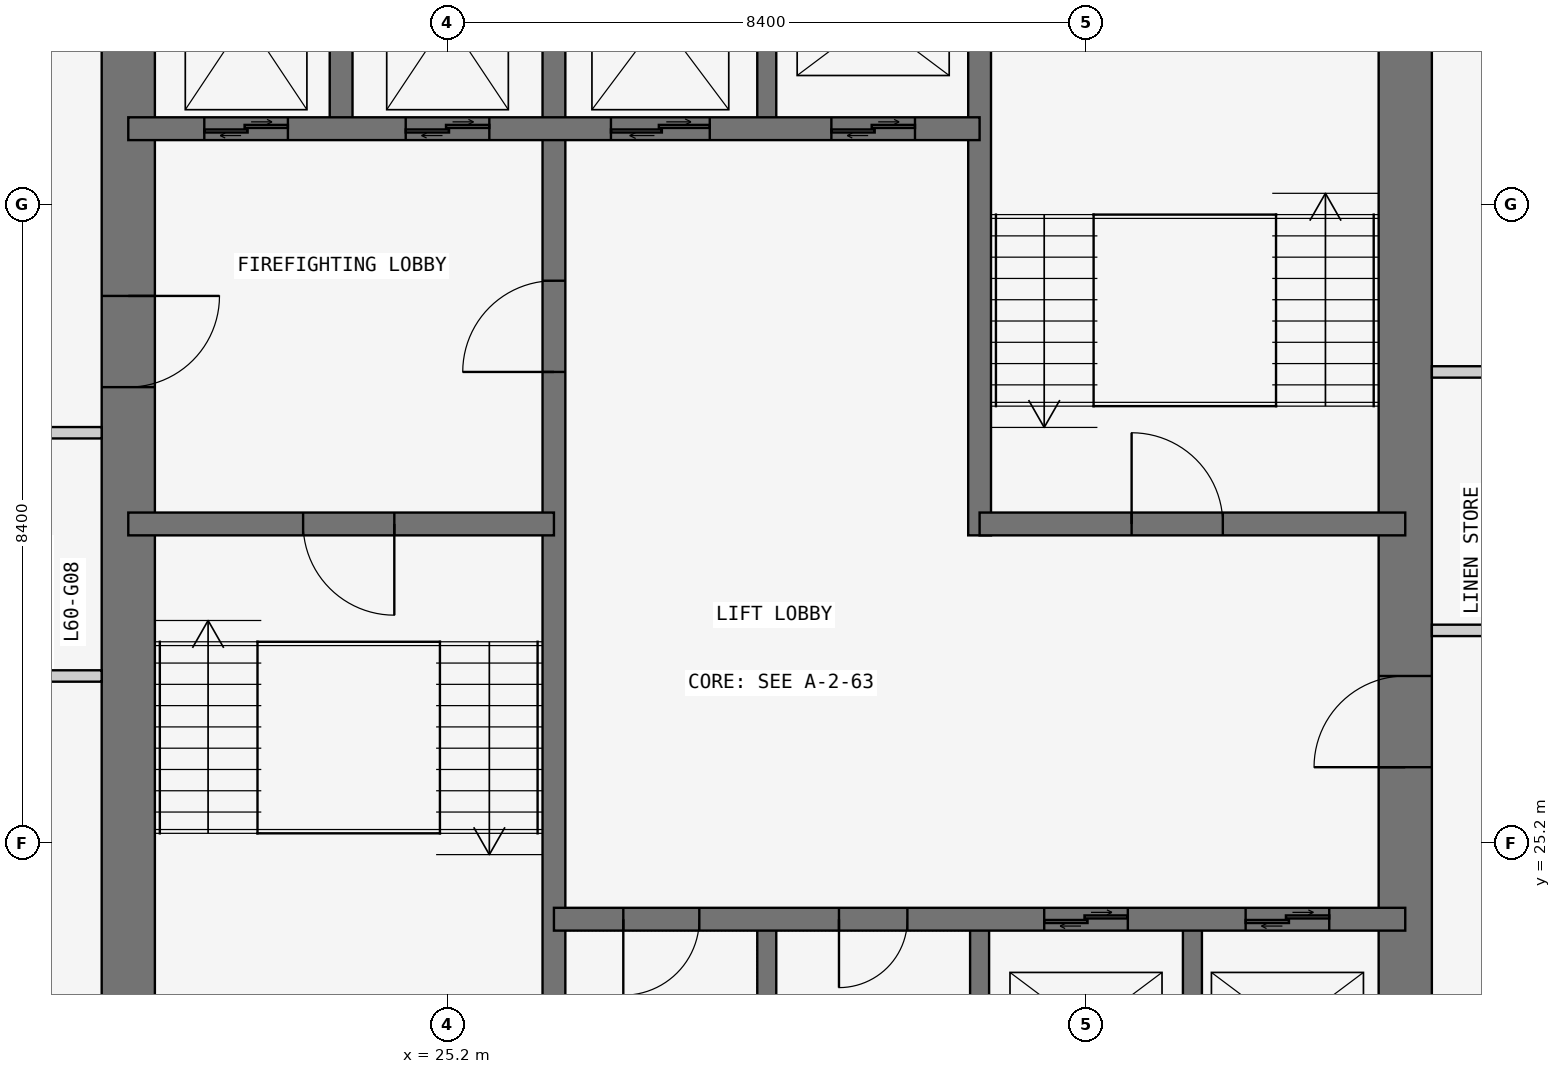
"""IFC4 building model, lengths in metres.
Left out: names, types, materials, properties, quantities, classifications, styles, units other than length and angle.
Written with IfcOpenShell. Run it as: python <this file> out.ifc"""

import sys

from ifc_helpers import new_model, si_unit, direction, frame, frame_2d, origin, place, context, subcontext, project, spatial, rectangle, extrude, element, fill, save


model = new_model("IFC4")
c1 = context("Model", 3, precision=1e-05, world=origin(), true_north=direction((0.0, 1.0)))
c2 = subcontext(c1, "Body", "Model", "MODEL_VIEW")
j1 = project(units=[si_unit("LENGTHUNIT", "METRE"), si_unit("PLANEANGLEUNIT", "RADIAN")], contexts=[c1])
p1 = place(None, origin())
s1 = spatial("IfcSite", under=j1, at=p1, CompositionType="ELEMENT")
p2 = place(p1, origin())
s2 = spatial("IfcBuilding", under=s1, at=p2, CompositionType="ELEMENT")
p3 = place(p2, frame((0.0, 0.0, 230.1)))
s3 = spatial("IfcBuildingStorey", under=s2, at=p3, CompositionType="ELEMENT", Elevation=230.1)
p4 = place(p3, frame((37.8, 21.0, 0.0), z_axis=(0.0, 0.0, 1.0), x_axis=(0.0, 1.0, 0.0)))
e1 = element("IfcWall", 1, at=p4, inside=s3, PredefinedType="SHEAR", context=c2, shape_type="SweptSolid", body=[
    extrude(rectangle(XDim=17.15, YDim=0.7, at=frame_2d((8.575, 0.0))), origin(), (0.0, 0.0, 1.0), 3.6),
])
p5 = place(p4, frame((5.2, 0.0, 0.0)))
e2 = element("IfcOpeningElement", 2, at=p5, cuts=e1, PredefinedType="OPENING", context=c2, shape_type="SweptSolid", body=[
    extrude(rectangle(XDim=1.2, YDim=2.1, at=frame_2d((0.6, 1.05))), frame((0.0, 0.36, 0.0), z_axis=(0.0, -1.0, 0.0), x_axis=(1.0, 0.0, 0.0)), (0.0, 0.0, 1.0), 0.72),
])
p6 = place(p3, frame((21.0, 37.8, 0.0), z_axis=(0.0, 0.0, 1.0), x_axis=(0.0, -1.0, 0.0)))
e3 = element("IfcWall", 3, at=p6, inside=s3, PredefinedType="SHEAR", context=c2, shape_type="SweptSolid", body=[
    extrude(rectangle(XDim=17.15, YDim=0.7, at=frame_2d((8.575, 0.0))), origin(), (0.0, 0.0, 1.0), 3.6),
])
p7 = place(p6, frame((5.4, 0.0, 0.0)))
e4 = element("IfcOpeningElement", 4, at=p7, cuts=e3, PredefinedType="OPENING", context=c2, shape_type="SweptSolid", body=[
    extrude(rectangle(XDim=1.2, YDim=2.1, at=frame_2d((0.6, 1.05))), frame((0.0, 0.36, 0.0), z_axis=(0.0, -1.0, 0.0), x_axis=(1.0, 0.0, 0.0)), (0.0, 0.0, 1.0), 0.72),
])
p8 = place(p3, frame((26.6, 21.0, 0.0), z_axis=(0.0, 0.0, 1.0), x_axis=(0.0, 1.0, 0.0)))
e5 = element("IfcWall", 5, at=p8, inside=s3, PredefinedType="SHEAR", context=c2, shape_type="SweptSolid", body=[
    extrude(rectangle(XDim=16.8, YDim=0.3, at=frame_2d((8.4, 0.0))), origin(), (0.0, 0.0, 1.0), 3.6),
])
p9 = place(p8, frame((10.4, 0.0, 0.0)))
e6 = element("IfcOpeningElement", 6, at=p9, cuts=e5, PredefinedType="OPENING", context=c2, shape_type="SweptSolid", body=[
    extrude(rectangle(XDim=1.2, YDim=2.1, at=frame_2d((0.6, 1.05))), frame((0.0, 0.16, 0.0), z_axis=(0.0, -1.0, 0.0), x_axis=(1.0, 0.0, 0.0)), (0.0, 0.0, 1.0), 0.32),
])
p10 = place(p3, frame((21.0, 29.4, 0.0), z_axis=(0.0, 0.0, 1.0), x_axis=(1.0, 0.0, 0.0)))
e7 = element("IfcWall", 7, at=p10, inside=s3, PredefinedType="SHEAR", context=c2, shape_type="SweptSolid", body=[
    extrude(rectangle(XDim=5.6, YDim=0.3, at=frame_2d((2.8, 0.0))), origin(), (0.0, 0.0, 1.0), 3.6),
])
p11 = place(p10, frame((2.3, 0.0, 0.0)))
e8 = element("IfcOpeningElement", 8, at=p11, cuts=e7, PredefinedType="OPENING", context=c2, shape_type="SweptSolid", body=[
    extrude(rectangle(XDim=1.2, YDim=2.1, at=frame_2d((0.6, 1.05))), frame((0.0, 0.16, 0.0), z_axis=(0.0, -1.0, 0.0), x_axis=(1.0, 0.0, 0.0)), (0.0, 0.0, 1.0), 0.32),
])
p12 = place(p3, frame((21.0, 34.6, 0.0), z_axis=(0.0, 0.0, 1.0), x_axis=(1.0, 0.0, 0.0)))
e9 = element("IfcWall", 9, at=p12, inside=s3, PredefinedType="SHEAR", context=c2, shape_type="SweptSolid", body=[
    extrude(rectangle(XDim=11.2, YDim=0.3, at=frame_2d((5.6, 0.0))), origin(), (0.0, 0.0, 1.0), 3.6),
])
p13 = place(p12, frame((9.25, 0.0, 0.0)))
e10 = element("IfcOpeningElement", 10, at=p13, cuts=e9, PredefinedType="OPENING", context=c2, shape_type="SweptSolid", body=[
    extrude(rectangle(XDim=1.1, YDim=2.1, at=frame_2d((0.55, 1.05))), frame((0.0, 0.16, 0.0), z_axis=(0.0, -1.0, 0.0), x_axis=(1.0, 0.0, 0.0)), (0.0, 0.0, 1.0), 0.32),
])
p14 = place(p12, frame((1.0, 0.0, 0.0)))
e11 = element("IfcOpeningElement", 11, at=p14, cuts=e9, PredefinedType="OPENING", context=c2, shape_type="SweptSolid", body=[
    extrude(rectangle(XDim=1.1, YDim=2.1, at=frame_2d((0.55, 1.05))), frame((0.0, 0.16, 0.0), z_axis=(0.0, -1.0, 0.0), x_axis=(1.0, 0.0, 0.0)), (0.0, 0.0, 1.0), 0.32),
])
p15 = place(p12, frame((3.65, 0.0, 0.0)))
e12 = element("IfcOpeningElement", 12, at=p15, cuts=e9, PredefinedType="OPENING", context=c2, shape_type="SweptSolid", body=[
    extrude(rectangle(XDim=1.1, YDim=2.1, at=frame_2d((0.55, 1.05))), frame((0.0, 0.16, 0.0), z_axis=(0.0, -1.0, 0.0), x_axis=(1.0, 0.0, 0.0)), (0.0, 0.0, 1.0), 0.32),
])
p16 = place(p12, frame((6.35, 0.0, 0.0)))
e13 = element("IfcOpeningElement", 13, at=p16, cuts=e9, PredefinedType="OPENING", context=c2, shape_type="SweptSolid", body=[
    extrude(rectangle(XDim=1.3, YDim=2.1, at=frame_2d((0.65, 1.05))), frame((0.0, 0.16, 0.0), z_axis=(0.0, -1.0, 0.0), x_axis=(1.0, 0.0, 0.0)), (0.0, 0.0, 1.0), 0.32),
])
p17 = place(p3, frame((23.8, 34.6, 0.0), z_axis=(0.0, 0.0, 1.0), x_axis=(0.0, 1.0, 0.0)))
e14 = element("IfcWall", 14, at=p17, inside=s3, PredefinedType="SHEAR", context=c2, shape_type="SweptSolid", body=[
    extrude(rectangle(XDim=3.2, YDim=0.3, at=frame_2d((1.6, 0.0))), origin(), (0.0, 0.0, 1.0), 3.6),
])
p18 = place(p3, frame((26.6, 24.2, 0.0), z_axis=(0.0, 0.0, 1.0), x_axis=(1.0, 0.0, 0.0)))
e15 = element("IfcWall", 15, at=p18, inside=s3, PredefinedType="SHEAR", context=c2, shape_type="SweptSolid", body=[
    extrude(rectangle(XDim=11.2, YDim=0.3, at=frame_2d((5.6, 0.0))), origin(), (0.0, 0.0, 1.0), 3.6),
])
p19 = place(p18, frame((0.913, 0.0, 0.0)))
e16 = element("IfcOpeningElement", 16, at=p19, cuts=e15, PredefinedType="OPENING", context=c2, shape_type="SweptSolid", body=[
    extrude(rectangle(XDim=1.0, YDim=2.1, at=frame_2d((0.5, 1.05))), frame((0.0, 0.16, 0.0), z_axis=(0.0, -1.0, 0.0), x_axis=(1.0, 0.0, 0.0)), (0.0, 0.0, 1.0), 0.32),
])
p20 = place(p18, frame((3.75, 0.0, 0.0)))
e17 = element("IfcOpeningElement", 17, at=p20, cuts=e15, PredefinedType="OPENING", context=c2, shape_type="SweptSolid", body=[
    extrude(rectangle(XDim=0.9, YDim=2.1, at=frame_2d((0.45, 1.05))), frame((0.0, 0.16, 0.0), z_axis=(0.0, -1.0, 0.0), x_axis=(1.0, 0.0, 0.0)), (0.0, 0.0, 1.0), 0.32),
])
p21 = place(p18, frame((6.45, 0.0, 0.0)))
e18 = element("IfcOpeningElement", 18, at=p21, cuts=e15, PredefinedType="OPENING", context=c2, shape_type="SweptSolid", body=[
    extrude(rectangle(XDim=1.1, YDim=2.1, at=frame_2d((0.55, 1.05))), frame((0.0, 0.16, 0.0), z_axis=(0.0, -1.0, 0.0), x_axis=(1.0, 0.0, 0.0)), (0.0, 0.0, 1.0), 0.32),
])
p22 = place(p18, frame((9.1, 0.0, 0.0)))
e19 = element("IfcOpeningElement", 19, at=p22, cuts=e15, PredefinedType="OPENING", context=c2, shape_type="SweptSolid", body=[
    extrude(rectangle(XDim=1.1, YDim=2.1, at=frame_2d((0.55, 1.05))), frame((0.0, 0.16, 0.0), z_axis=(0.0, -1.0, 0.0), x_axis=(1.0, 0.0, 0.0)), (0.0, 0.0, 1.0), 0.32),
])
p23 = place(p3, frame((32.2, 29.25, 0.0), z_axis=(0.0, 0.0, 1.0), x_axis=(0.0, 1.0, 0.0)))
e20 = element("IfcWall", 20, at=p23, inside=s3, PredefinedType="SHEAR", context=c2, shape_type="SweptSolid", body=[
    extrude(rectangle(XDim=8.55, YDim=0.3, at=frame_2d((4.275, 0.0))), origin(), (0.0, 0.0, 1.0), 3.6),
])
p24 = place(p3, frame((32.2, 29.4, 0.0), z_axis=(0.0, 0.0, 1.0), x_axis=(1.0, 0.0, 0.0)))
e21 = element("IfcWall", 21, at=p24, inside=s3, PredefinedType="SHEAR", context=c2, shape_type="SweptSolid", body=[
    extrude(rectangle(XDim=5.6, YDim=0.3, at=frame_2d((2.8, 0.0))), origin(), (0.0, 0.0, 1.0), 3.6),
])
p25 = place(p24, frame((2.0, 0.0, 0.0)))
e22 = element("IfcOpeningElement", 22, at=p25, cuts=e21, PredefinedType="OPENING", context=c2, shape_type="SweptSolid", body=[
    extrude(rectangle(XDim=1.2, YDim=2.1, at=frame_2d((0.6, 1.05))), frame((0.0, 0.16, 0.0), z_axis=(0.0, -1.0, 0.0), x_axis=(1.0, 0.0, 0.0)), (0.0, 0.0, 1.0), 0.32),
])
for number, where, z_axis, x_axis in (
    (23, (29.4, 21.0, 0.0), (0.0, 0.0, 1.0), (0.0, 1.0, 0.0)),
    (24, (32.2, 21.0, 0.0), (0.0, 0.0, 1.0), (0.0, 1.0, 0.0)),
    (25, (35.0, 21.0, 0.0), (0.0, 0.0, 1.0), (0.0, 1.0, 0.0)),
    (26, (29.4, 34.6, 0.0), (0.0, 0.0, 1.0), (0.0, 1.0, 0.0)),
):
    element("IfcWall", number, at=place(p3, frame(where, z_axis=z_axis, x_axis=x_axis)), inside=s3, PredefinedType="SHEAR", context=c2, shape_type="SweptSolid", body=[
        extrude(rectangle(XDim=3.2, YDim=0.25, at=frame_2d((1.6, 0.0))), origin(), (0.0, 0.0, 1.0), 3.6),
    ])
for number, where, z_axis, x_axis in (
    (27, (38.15, 28.0, 0.0), (0.0, 0.0, 1.0), (1.0, 0.0, 0.0)),
    (28, (40.6, 31.4, 0.0), (0.0, 0.0, 1.0), (-1.0, 0.0, 0.0)),
):
    element("IfcWall", number, at=place(p3, frame(where, z_axis=z_axis, x_axis=x_axis)), inside=s3, PredefinedType="PARTITIONING", context=c2, shape_type="SweptSolid", body=[
        extrude(rectangle(XDim=2.45, YDim=0.15, at=frame_2d((1.225, 0.0))), origin(), (0.0, 0.0, 1.0), 3.45),
    ])
for number, where, z_axis, x_axis in (
    (29, (20.65, 30.6, 0.0), (0.0, 0.0, 1.0), (-1.0, 0.0, 0.0)),
    (30, (18.55, 27.4, 0.0), (0.0, 0.0, 1.0), (1.0, 0.0, 0.0)),
):
    element("IfcWall", number, at=place(p3, frame(where, z_axis=z_axis, x_axis=x_axis)), inside=s3, PredefinedType="PARTITIONING", context=c2, shape_type="SweptSolid", body=[
        extrude(rectangle(XDim=2.1, YDim=0.15, at=frame_2d((1.05, 0.0))), origin(), (0.0, 0.0, 1.0), 3.45),
    ])
p26 = place(p7, origin())
e31 = element("IfcDoor", 31, at=p26, inside=s3, OperationType="SINGLE_SWING_LEFT", PredefinedType="DOOR", context=c2, shape_type="SweptSolid", body=[
    extrude(rectangle(XDim=1.2, YDim=2.1, at=frame_2d((0.6, 1.05))), frame((0.0, 0.025, 0.0), z_axis=(0.0, -1.0, 0.0), x_axis=(1.0, 0.0, 0.0)), (0.0, 0.0, 1.0), 0.05),
])
fill(e4, e31)
p27 = place(p11, frame((1.2, 0.0, 0.0), z_axis=(0.0, 0.0, 1.0), x_axis=(-1.0, 0.0, 0.0)))
e32 = element("IfcDoor", 32, at=p27, inside=s3, OperationType="SINGLE_SWING_LEFT", PredefinedType="DOOR", context=c2, shape_type="SweptSolid", body=[
    extrude(rectangle(XDim=1.2, YDim=2.1, at=frame_2d((0.6, 1.05))), frame((0.0, 0.025, 0.0), z_axis=(0.0, -1.0, 0.0), x_axis=(1.0, 0.0, 0.0)), (0.0, 0.0, 1.0), 0.05),
])
fill(e8, e32)
p28 = place(p9, origin())
e33 = element("IfcDoor", 33, at=p28, inside=s3, OperationType="SINGLE_SWING_LEFT", PredefinedType="DOOR", context=c2, shape_type="SweptSolid", body=[
    extrude(rectangle(XDim=1.2, YDim=2.1, at=frame_2d((0.6, 1.05))), frame((0.0, 0.025, 0.0), z_axis=(0.0, -1.0, 0.0), x_axis=(1.0, 0.0, 0.0)), (0.0, 0.0, 1.0), 0.05),
])
fill(e6, e33)
p29 = place(p5, origin())
e34 = element("IfcDoor", 34, at=p29, inside=s3, OperationType="SINGLE_SWING_LEFT", PredefinedType="DOOR", context=c2, shape_type="SweptSolid", body=[
    extrude(rectangle(XDim=1.2, YDim=2.1, at=frame_2d((0.6, 1.05))), frame((0.0, 0.025, 0.0), z_axis=(0.0, -1.0, 0.0), x_axis=(1.0, 0.0, 0.0)), (0.0, 0.0, 1.0), 0.05),
])
fill(e2, e34)
p30 = place(p25, origin())
e35 = element("IfcDoor", 35, at=p30, inside=s3, OperationType="SINGLE_SWING_LEFT", PredefinedType="DOOR", context=c2, shape_type="SweptSolid", body=[
    extrude(rectangle(XDim=1.2, YDim=2.1, at=frame_2d((0.6, 1.05))), frame((0.0, 0.025, 0.0), z_axis=(0.0, -1.0, 0.0), x_axis=(1.0, 0.0, 0.0)), (0.0, 0.0, 1.0), 0.05),
])
fill(e22, e35)
p31 = place(p19, frame((1.0, 0.0, 0.0), z_axis=(0.0, 0.0, 1.0), x_axis=(-1.0, 0.0, 0.0)))
e36 = element("IfcDoor", 36, at=p31, inside=s3, OperationType="SINGLE_SWING_RIGHT", PredefinedType="DOOR", context=c2, shape_type="SweptSolid", body=[
    extrude(rectangle(XDim=1.0, YDim=2.1, at=frame_2d((0.5, 1.05))), frame((0.0, 0.025, 0.0), z_axis=(0.0, -1.0, 0.0), x_axis=(1.0, 0.0, 0.0)), (0.0, 0.0, 1.0), 0.05),
])
fill(e16, e36)
p32 = place(p20, frame((0.9, 0.0, 0.0), z_axis=(0.0, 0.0, 1.0), x_axis=(-1.0, 0.0, 0.0)))
e37 = element("IfcDoor", 37, at=p32, inside=s3, OperationType="SINGLE_SWING_RIGHT", PredefinedType="DOOR", context=c2, shape_type="SweptSolid", body=[
    extrude(rectangle(XDim=0.9, YDim=2.1, at=frame_2d((0.45, 1.05))), frame((0.0, 0.025, 0.0), z_axis=(0.0, -1.0, 0.0), x_axis=(1.0, 0.0, 0.0)), (0.0, 0.0, 1.0), 0.05),
])
fill(e17, e37)
p33 = place(p21, origin())
e38 = element("IfcDoor", 38, at=p33, inside=s3, OperationType="DOUBLE_DOOR_SLIDING", PredefinedType="DOOR", context=c2, shape_type="SweptSolid", body=[
    extrude(rectangle(XDim=1.1, YDim=2.1, at=frame_2d((0.55, 1.05))), frame((0.0, 0.025, 0.0), z_axis=(0.0, -1.0, 0.0), x_axis=(1.0, 0.0, 0.0)), (0.0, 0.0, 1.0), 0.05),
])
fill(e18, e38)
p34 = place(p22, origin())
e39 = element("IfcDoor", 39, at=p34, inside=s3, OperationType="DOUBLE_DOOR_SLIDING", PredefinedType="DOOR", context=c2, shape_type="SweptSolid", body=[
    extrude(rectangle(XDim=1.1, YDim=2.1, at=frame_2d((0.55, 1.05))), frame((0.0, 0.025, 0.0), z_axis=(0.0, -1.0, 0.0), x_axis=(1.0, 0.0, 0.0)), (0.0, 0.0, 1.0), 0.05),
])
fill(e19, e39)
p35 = place(p13, origin())
e40 = element("IfcDoor", 40, at=p35, inside=s3, OperationType="DOUBLE_DOOR_SLIDING", PredefinedType="DOOR", context=c2, shape_type="SweptSolid", body=[
    extrude(rectangle(XDim=1.1, YDim=2.1, at=frame_2d((0.55, 1.05))), frame((0.0, 0.025, 0.0), z_axis=(0.0, -1.0, 0.0), x_axis=(1.0, 0.0, 0.0)), (0.0, 0.0, 1.0), 0.05),
])
fill(e10, e40)
p36 = place(p14, origin())
e41 = element("IfcDoor", 41, at=p36, inside=s3, OperationType="DOUBLE_DOOR_SLIDING", PredefinedType="DOOR", context=c2, shape_type="SweptSolid", body=[
    extrude(rectangle(XDim=1.1, YDim=2.1, at=frame_2d((0.55, 1.05))), frame((0.0, 0.025, 0.0), z_axis=(0.0, -1.0, 0.0), x_axis=(1.0, 0.0, 0.0)), (0.0, 0.0, 1.0), 0.05),
])
fill(e11, e41)
p37 = place(p15, origin())
e42 = element("IfcDoor", 42, at=p37, inside=s3, OperationType="DOUBLE_DOOR_SLIDING", PredefinedType="DOOR", context=c2, shape_type="SweptSolid", body=[
    extrude(rectangle(XDim=1.1, YDim=2.1, at=frame_2d((0.55, 1.05))), frame((0.0, 0.025, 0.0), z_axis=(0.0, -1.0, 0.0), x_axis=(1.0, 0.0, 0.0)), (0.0, 0.0, 1.0), 0.05),
])
fill(e12, e42)
p38 = place(p16, origin())
e43 = element("IfcDoor", 43, at=p38, inside=s3, OperationType="DOUBLE_DOOR_SLIDING", PredefinedType="DOOR", context=c2, shape_type="SweptSolid", body=[
    extrude(rectangle(XDim=1.3, YDim=2.1, at=frame_2d((0.65, 1.05))), frame((0.0, 0.025, 0.0), z_axis=(0.0, -1.0, 0.0), x_axis=(1.0, 0.0, 0.0)), (0.0, 0.0, 1.0), 0.05),
])
fill(e13, e43)
save(model, sys.argv[1])
